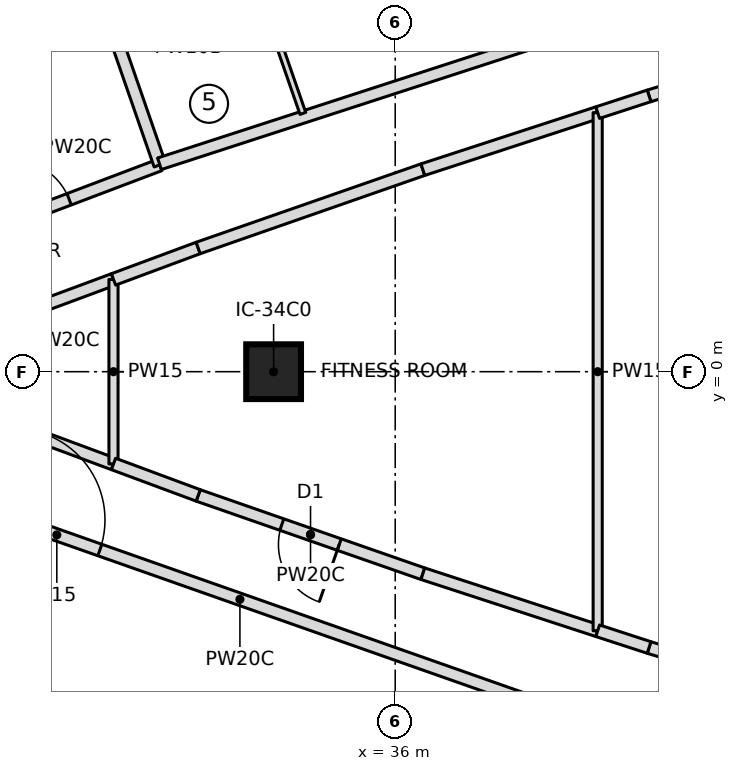
"""IFC4 building model, lengths in metres.
Left out: names, types, materials, properties, quantities, classifications, styles, units other than length and angle.
Written with IfcOpenShell. Run it as: python <this file> out.ifc"""

import sys

from ifc_helpers import new_model, si_unit, direction, frame, frame_2d, origin, origin_2d, place, context, subcontext, project, spatial, rectangle, extrude, element, fill, save


model = new_model("IFC4")
c1 = context("Model", 3, precision=1e-05, world=origin(), true_north=direction((0.0, 1.0)))
c2 = subcontext(c1, "Body", "Model", "MODEL_VIEW")
j1 = project(units=[si_unit("LENGTHUNIT", "METRE"), si_unit("PLANEANGLEUNIT", "RADIAN")], contexts=[c1])
p1 = place(None, origin())
s1 = spatial("IfcSite", under=j1, at=p1, CompositionType="ELEMENT")
p2 = place(p1, origin())
s2 = spatial("IfcBuilding", under=s1, at=p2, CompositionType="ELEMENT")
p3 = place(p2, frame((0.0, 0.0, 267.9)))
s3 = spatial("IfcBuildingStorey", under=s2, at=p3, CompositionType="ELEMENT", Elevation=267.9)
p4 = place(p3, frame((34.0, 0.0, 0.0), z_axis=(0.0, 0.0, 1.0), x_axis=(1.0, 0.0, 0.0)))
e1 = element("IfcColumn", 1, at=p4, inside=s3, PredefinedType="COLUMN", context=c2, shape_type="SweptSolid", body=[
    extrude(rectangle(XDim=0.9, YDim=0.9, at=origin_2d()), origin(), (0.0, 0.0, 1.0), 3.55),
])
p5 = place(p3, frame((26.85, 1.401, 0.0), z_axis=(0.0, 0.0, 1.0), x_axis=(0.935181367748, 0.354169181912, 0.0)))
e2 = element("IfcWall", 2, at=p5, inside=s3, PredefinedType="PARTITIONING", context=c2, shape_type="SweptSolid", body=[
    extrude(rectangle(XDim=5.645, YDim=0.2, at=frame_2d((2.823, 0.0))), origin(), (0.0, 0.0, 1.0), 3.25),
])
p6 = place(p5, frame((3.05, 0.0, 0.0)))
e3 = element("IfcOpeningElement", 3, at=p6, cuts=e2, PredefinedType="OPENING", context=c2, shape_type="SweptSolid", body=[
    extrude(rectangle(XDim=1.0, YDim=2.1, at=frame_2d((0.5, 1.05))), frame((0.0, 0.11, 0.0), z_axis=(0.0, -1.0, 0.0), x_axis=(1.0, 0.0, 0.0)), (0.0, 0.0, 1.0), 0.22),
])
p7 = place(p3, frame((32.129, 3.401, 0.0), z_axis=(0.0, 0.0, 1.0), x_axis=(-0.327724115377, 0.944773467134, 0.0)))
e4 = element("IfcWall", 4, at=p7, inside=s3, PredefinedType="PARTITIONING", context=c2, shape_type="SweptSolid", body=[
    extrude(rectangle(XDim=9.702, YDim=0.2, at=frame_2d((4.851, 0.0))), origin(), (0.0, 0.0, 1.0), 3.25),
])
p8 = place(p3, frame((44.031, 7.286, 0.0), z_axis=(0.0, 0.0, 1.0), x_axis=(-0.951130603276, -0.308788885019, 0.0)))
e5 = element("IfcWall", 5, at=p8, inside=s3, PredefinedType="PARTITIONING", context=c2, shape_type="SweptSolid", body=[
    extrude(rectangle(XDim=12.521, YDim=0.2, at=frame_2d((6.26, 0.0))), origin(), (0.0, 0.0, 1.0), 3.25),
])
p9 = place(p8, frame((0.35, 0.0, 0.0)))
e6 = element("IfcOpeningElement", 6, at=p9, cuts=e5, PredefinedType="OPENING", context=c2, shape_type="SweptSolid", body=[
    extrude(rectangle(XDim=1.5, YDim=2.1, at=frame_2d((0.75, 1.05))), frame((0.0, 0.11, 0.0), z_axis=(0.0, -1.0, 0.0), x_axis=(1.0, 0.0, 0.0)), (0.0, 0.0, 1.0), 0.22),
])
p10 = place(p3, frame((33.735, 6.399, 0.0), z_axis=(0.0, 0.0, 1.0), x_axis=(0.32768871219, -0.944785747089, 0.0)))
e7 = element("IfcWall", 7, at=p10, inside=s3, PredefinedType="PARTITIONING", context=c2, shape_type="SweptSolid", body=[
    extrude(rectangle(XDim=2.277, YDim=0.1, at=frame_2d((1.138, 0.0))), origin(), (0.0, 0.0, 1.0), 3.25),
])
p11 = place(p3, frame((26.85, -1.423, 0.0), z_axis=(0.0, 0.0, 1.0), x_axis=(0.943328585164, -0.331860182022, 0.0)))
e8 = element("IfcWall", 8, at=p11, inside=s3, PredefinedType="PARTITIONING", context=c2, shape_type="SweptSolid", body=[
    extrude(rectangle(XDim=13.984, YDim=0.2, at=frame_2d((6.992, 0.0))), origin(), (0.0, 0.0, 1.0), 3.25),
])
p12 = place(p11, frame((3.05, 0.0, 0.0)))
e9 = element("IfcOpeningElement", 9, at=p12, cuts=e8, PredefinedType="OPENING", context=c2, shape_type="SweptSolid", body=[
    extrude(rectangle(XDim=1.5, YDim=2.1, at=frame_2d((0.75, 1.05))), frame((0.0, 0.11, 0.0), z_axis=(0.0, -1.0, 0.0), x_axis=(1.0, 0.0, 0.0)), (0.0, 0.0, 1.0), 0.22),
])
for number, where, z_axis, x_axis in (
    (10, (29.092, 0.673, 0.0), (0.0, 0.0, 1.0), (0.937, 0.348, 0.0)),
    (11, (31.367, -1.518, 0.0), (0.0, 0.0, 1.0), (-0.937, 0.348, 0.0)),
):
    element("IfcWall", number, at=place(p3, frame(where, z_axis=z_axis, x_axis=x_axis)), inside=s3, PredefinedType="PARTITIONING", context=c2, shape_type="SweptSolid", body=[
        extrude(rectangle(XDim=2.427, YDim=0.2, at=frame_2d((1.214, 0.0))), origin(), (0.0, 0.0, 1.0), 3.25),
    ])
p13 = place(p3, frame((31.367, -1.518, 0.0), z_axis=(0.0, 0.0, 1.0), x_axis=(0.0, 1.0, 0.0)))
e12 = element("IfcWall", 12, at=p13, inside=s3, PredefinedType="PARTITIONING", context=c2, shape_type="SweptSolid", body=[
    extrude(rectangle(XDim=3.035, YDim=0.15, at=frame_2d((1.518, 0.0))), origin(), (0.0, 0.0, 1.0), 3.25),
])
p14 = place(p3, frame((36.455, -3.323, 0.0), z_axis=(0.0, 0.0, 1.0), x_axis=(-0.944283635062, 0.329132825093, 0.0)))
e13 = element("IfcWall", 13, at=p14, inside=s3, PredefinedType="PARTITIONING", context=c2, shape_type="SweptSolid", body=[
    extrude(rectangle(XDim=3.913, YDim=0.2, at=frame_2d((1.957, 0.0))), origin(), (0.0, 0.0, 1.0), 3.25),
])
p15 = place(p14, frame((1.457, 0.0, 0.0)))
e14 = element("IfcOpeningElement", 14, at=p15, cuts=e13, PredefinedType="OPENING", context=c2, shape_type="SweptSolid", body=[
    extrude(rectangle(XDim=1.0, YDim=2.1, at=frame_2d((0.5, 1.05))), frame((0.0, 0.11, 0.0), z_axis=(0.0, -1.0, 0.0), x_axis=(1.0, 0.0, 0.0)), (0.0, 0.0, 1.0), 0.22),
])
p16 = place(p3, frame((39.33, -4.26, 0.0), z_axis=(0.0, 0.0, 1.0), x_axis=(-0.95070604111, 0.310093572003, 0.0)))
e15 = element("IfcWall", 15, at=p16, inside=s3, PredefinedType="PARTITIONING", context=c2, shape_type="SweptSolid", body=[
    extrude(rectangle(XDim=3.024, YDim=0.2, at=frame_2d((1.512, 0.0))), origin(), (0.0, 0.0, 1.0), 3.25),
])
for number, where, z_axis, x_axis in (
    (16, (32.76, -2.035, 0.0), (0.0, 0.0, 1.0), (-0.937, 0.348, 0.0)),
    (17, (31.367, 1.518, 0.0), (0.0, 0.0, 1.0), (0.937, 0.348, 0.0)),
):
    element("IfcWall", number, at=place(p3, frame(where, z_axis=z_axis, x_axis=x_axis)), inside=s3, PredefinedType="PARTITIONING", context=c2, shape_type="SweptSolid", body=[
        extrude(rectangle(XDim=1.486, YDim=0.2, at=frame_2d((0.743, 0.0))), origin(), (0.0, 0.0, 1.0), 3.25),
    ])
p17 = place(p3, frame((32.76, 2.035, 0.0), z_axis=(0.0, 0.0, 1.0), x_axis=(0.944283635062, 0.329132825093, 0.0)))
e18 = element("IfcWall", 18, at=p17, inside=s3, PredefinedType="PARTITIONING", context=c2, shape_type="SweptSolid", body=[
    extrude(rectangle(XDim=3.913, YDim=0.2, at=frame_2d((1.957, 0.0))), origin(), (0.0, 0.0, 1.0), 3.25),
])
p18 = place(p3, frame((36.455, 3.323, 0.0), z_axis=(0.0, 0.0, 1.0), x_axis=(0.95070604111, 0.310093572003, 0.0)))
e19 = element("IfcWall", 19, at=p18, inside=s3, PredefinedType="PARTITIONING", context=c2, shape_type="SweptSolid", body=[
    extrude(rectangle(XDim=3.024, YDim=0.2, at=frame_2d((1.512, 0.0))), origin(), (0.0, 0.0, 1.0), 3.25),
])
p19 = place(p3, frame((39.33, -4.26, 0.0), z_axis=(0.0, 0.0, 1.0), x_axis=(0.0, 1.0, 0.0)))
e20 = element("IfcWall", 20, at=p19, inside=s3, PredefinedType="PARTITIONING", context=c2, shape_type="SweptSolid", body=[
    extrude(rectangle(XDim=8.521, YDim=0.15, at=frame_2d((4.26, 0.0))), origin(), (0.0, 0.0, 1.0), 3.25),
])
p20 = place(p3, frame((40.175, 4.536, 0.0), z_axis=(0.0, 0.0, 1.0), x_axis=(0.956739496331, 0.290945933396, 0.0)))
e21 = element("IfcWall", 21, at=p20, inside=s3, PredefinedType="PARTITIONING", context=c2, shape_type="SweptSolid", body=[
    extrude(rectangle(XDim=2.252, YDim=0.2, at=frame_2d((1.126, 0.0))), origin(), (0.0, 0.0, 1.0), 3.25),
])
p21 = place(p20, frame((0.626, 0.0, 0.0)))
e22 = element("IfcOpeningElement", 22, at=p21, cuts=e21, PredefinedType="OPENING", context=c2, shape_type="SweptSolid", body=[
    extrude(rectangle(XDim=1.0, YDim=2.1, at=frame_2d((0.5, 1.05))), frame((0.0, 0.11, 0.0), z_axis=(0.0, -1.0, 0.0), x_axis=(1.0, 0.0, 0.0)), (0.0, 0.0, 1.0), 0.22),
])
p22 = place(p3, frame((42.33, -5.191, 0.0), z_axis=(0.0, 0.0, 1.0), x_axis=(-0.956739496331, 0.290945933396, 0.0)))
e23 = element("IfcWall", 23, at=p22, inside=s3, PredefinedType="PARTITIONING", context=c2, shape_type="SweptSolid", body=[
    extrude(rectangle(XDim=2.252, YDim=0.2, at=frame_2d((1.126, 0.0))), origin(), (0.0, 0.0, 1.0), 3.25),
])
for number, where, z_axis, x_axis in (
    (24, (40.175, -4.536, 0.0), (0.0, 0.0, 1.0), (-0.951, 0.31, 0.0)),
    (25, (39.33, 4.26, 0.0), (0.0, 0.0, 1.0), (0.951, 0.31, 0.0)),
):
    element("IfcWall", number, at=place(p3, frame(where, z_axis=z_axis, x_axis=x_axis)), inside=s3, PredefinedType="PARTITIONING", context=c2, shape_type="SweptSolid", body=[
        extrude(rectangle(XDim=0.889, YDim=0.2, at=frame_2d((0.444, 0.0))), origin(), (0.0, 0.0, 1.0), 3.25),
    ])
p23 = place(p6, origin())
e26 = element("IfcDoor", 26, at=p23, inside=s3, OperationType="SINGLE_SWING_RIGHT", PredefinedType="DOOR", context=c2, shape_type="SweptSolid", body=[
    extrude(rectangle(XDim=1.0, YDim=2.1, at=frame_2d((0.5, 1.05))), frame((0.0, 0.025, 0.0), z_axis=(0.0, -1.0, 0.0), x_axis=(1.0, 0.0, 0.0)), (0.0, 0.0, 1.0), 0.05),
])
fill(e3, e26)
p24 = place(p12, origin())
e27 = element("IfcDoor", 27, at=p24, inside=s3, OperationType="DOUBLE_DOOR_SINGLE_SWING", PredefinedType="DOOR", context=c2, shape_type="SweptSolid", body=[
    extrude(rectangle(XDim=1.5, YDim=2.1, at=frame_2d((0.75, 1.05))), frame((0.0, 0.025, 0.0), z_axis=(0.0, -1.0, 0.0), x_axis=(1.0, 0.0, 0.0)), (0.0, 0.0, 1.0), 0.05),
])
fill(e9, e27)
p25 = place(p15, origin())
e28 = element("IfcDoor", 28, at=p25, inside=s3, OperationType="SINGLE_SWING_LEFT", PredefinedType="DOOR", context=c2, shape_type="SweptSolid", body=[
    extrude(rectangle(XDim=1.0, YDim=2.1, at=frame_2d((0.5, 1.05))), frame((0.0, 0.025, 0.0), z_axis=(0.0, -1.0, 0.0), x_axis=(1.0, 0.0, 0.0)), (0.0, 0.0, 1.0), 0.05),
])
fill(e14, e28)
save(model, sys.argv[1])
